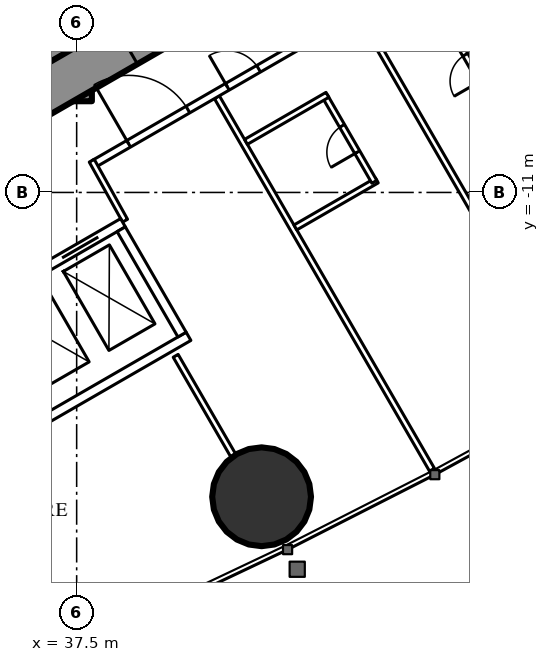
"""IFC4 building model, lengths in metres.
Left out: names, types, materials, properties, quantities, classifications, styles, units other than length and angle.
Written with IfcOpenShell. Run it as: python <this file> out.ifc"""

import sys

from ifc_helpers import new_model, si_unit, direction, frame, frame_2d, origin, origin_2d, place, context, subcontext, project, spatial, rectangle, hollow_circle, extrude, element, fill, save


model = new_model("IFC4")
c1 = context("Model", 3, precision=1e-05, world=origin(), true_north=direction((0.0, 1.0)))
c2 = subcontext(c1, "Body", "Model", "MODEL_VIEW")
j1 = project(units=[si_unit("LENGTHUNIT", "METRE"), si_unit("PLANEANGLEUNIT", "RADIAN")], contexts=[c1])
p1 = place(None, origin())
s1 = spatial("IfcSite", under=j1, at=p1, CompositionType="ELEMENT")
p2 = place(p1, origin())
s2 = spatial("IfcBuilding", under=s1, at=p2, CompositionType="ELEMENT")
p3 = place(p2, frame((0.0, 0.0, 90.6)))
s3 = spatial("IfcBuildingStorey", under=s2, at=p3, CompositionType="ELEMENT", Elevation=90.6)
p4 = place(p3, frame((42.366, -19.007, 0.0), z_axis=(0.0, 0.0, 1.0), x_axis=(1.0, 0.0, 0.0)))
e1 = element("IfcColumn", 1, at=p4, inside=s3, PredefinedType="COLUMN", context=c2, shape_type="SweptSolid", body=[
    extrude(hollow_circle(Radius=1.3, WallThickness=0.1, at=origin_2d()), origin(), (0.0, 0.0, 1.0), 3.5),
])
p5 = place(p3, frame((37.3, -8.6, 0.0), z_axis=(0.0, 0.0, 1.0), x_axis=(0.0, 1.0, 0.0)))
e2 = element("IfcWall", 2, at=p5, inside=s3, PredefinedType="SHEAR", context=c2, shape_type="SweptSolid", body=[
    extrude(rectangle(XDim=17.2, YDim=1.2, at=frame_2d((8.6, 0.0))), origin(), (0.0, 0.0, 1.0), 3.5),
])
p6 = place(p5, frame((7.7, 0.0, 0.0)))
e3 = element("IfcOpeningElement", 3, at=p6, cuts=e2, PredefinedType="OPENING", context=c2, shape_type="SweptSolid", body=[
    extrude(rectangle(XDim=1.8, YDim=2.2, at=frame_2d((0.9, 1.1))), frame((0.0, 0.61, 0.0), z_axis=(0.0, -1.0, 0.0), x_axis=(1.0, 0.0, 0.0)), (0.0, 0.0, 1.0), 1.22),
])
p7 = place(p3, frame((27.2, -13.8, 0.0), z_axis=(0.0, 0.0, 1.0), x_axis=(0.866027159892, 0.499996958321, 0.0)))
e4 = element("IfcWall", 4, at=p7, inside=s3, PredefinedType="SHEAR", context=c2, shape_type="SweptSolid", body=[
    extrude(rectangle(XDim=27.947, YDim=1.2, at=frame_2d((13.973, 0.0))), origin(), (0.0, 0.0, 1.0), 3.5),
])
p8 = place(p7, frame((4.6, 0.0, 0.0)))
e5 = element("IfcOpeningElement", 5, at=p8, cuts=e4, PredefinedType="OPENING", context=c2, shape_type="SweptSolid", body=[
    extrude(rectangle(XDim=1.0, YDim=2.2, at=frame_2d((0.5, 1.1))), frame((0.0, 0.61, 0.0), z_axis=(0.0, -1.0, 0.0), x_axis=(1.0, 0.0, 0.0)), (0.0, 0.0, 1.0), 1.22),
])
p9 = place(p7, frame((13.395, 0.0, 0.0)))
e6 = element("IfcOpeningElement", 6, at=p9, cuts=e4, PredefinedType="OPENING", context=c2, shape_type="SweptSolid", body=[
    extrude(rectangle(XDim=1.8, YDim=2.2, at=frame_2d((0.9, 1.1))), frame((0.0, 0.61, 0.0), z_axis=(0.0, -1.0, 0.0), x_axis=(1.0, 0.0, 0.0)), (0.0, 0.0, 1.0), 1.22),
])
p10 = place(p3, frame((41.19, -8.494, 0.0), z_axis=(0.0, 0.0, 1.0), x_axis=(0.49999258054, -0.866029687369, 0.0)))
e7 = element("IfcWall", 7, at=p10, inside=s3, PredefinedType="PARTITIONING", context=c2, shape_type="SweptSolid", body=[
    extrude(rectangle(XDim=11.318, YDim=0.15, at=frame_2d((5.659, 0.0))), origin(), (0.0, 0.0, 1.0), 3.25),
])
p11 = place(p3, frame((44.954, -6.321, 0.0), z_axis=(0.0, 0.0, 1.0), x_axis=(0.500018676722, -0.866014620505, 0.0)))
e8 = element("IfcWall", 8, at=p11, inside=s3, PredefinedType="PARTITIONING", context=c2, shape_type="SweptSolid", body=[
    extrude(rectangle(XDim=8.704, YDim=0.15, at=frame_2d((4.352, 0.0))), origin(), (0.0, 0.0, 1.0), 2.2),
])
p12 = place(p3, frame((40.105, -15.299, 0.0), z_axis=(0.0, 0.0, 1.0), x_axis=(0.499978822259, -0.866037630414, 0.0)))
e9 = element("IfcWall", 9, at=p12, inside=s3, PredefinedType="PARTITIONING", context=c2, shape_type="SweptSolid", body=[
    extrude(rectangle(XDim=3.023, YDim=0.15, at=frame_2d((1.511, 0.0))), origin(), (0.0, 0.0, 1.0), 3.25),
])
p13 = place(p3, frame((37.96, -10.243, 0.0), z_axis=(0.0, 0.0, 1.0), x_axis=(0.866026429433, 0.499998223521, 0.0)))
e10 = element("IfcWall", 10, at=p13, inside=s3, PredefinedType="PARTITIONING", context=c2, shape_type="SweptSolid", body=[
    extrude(rectangle(XDim=20.487, YDim=0.2, at=frame_2d((10.243, 0.0))), origin(), (0.0, 0.0, 1.0), 3.25),
])
p14 = place(p13, frame((4.047, 0.0, 0.0)))
e11 = element("IfcOpeningElement", 11, at=p14, cuts=e10, PredefinedType="OPENING", context=c2, shape_type="SweptSolid", body=[
    extrude(rectangle(XDim=0.95, YDim=2.2, at=frame_2d((0.475, 1.1))), frame((0.0, 0.11, 0.0), z_axis=(0.0, -1.0, 0.0), x_axis=(1.0, 0.0, 0.0)), (0.0, 0.0, 1.0), 0.22),
])
p15 = place(p13, frame((11.04, 0.0, 0.0)))
e12 = element("IfcOpeningElement", 12, at=p15, cuts=e10, PredefinedType="OPENING", context=c2, shape_type="SweptSolid", body=[
    extrude(rectangle(XDim=0.95, YDim=2.2, at=frame_2d((0.475, 1.1))), frame((0.0, 0.11, 0.0), z_axis=(0.0, -1.0, 0.0), x_axis=(1.0, 0.0, 0.0)), (0.0, 0.0, 1.0), 0.22),
])
p16 = place(p13, frame((13.035, 0.0, 0.0)))
e13 = element("IfcOpeningElement", 13, at=p16, cuts=e10, PredefinedType="OPENING", context=c2, shape_type="SweptSolid", body=[
    extrude(rectangle(XDim=0.95, YDim=2.2, at=frame_2d((0.475, 1.1))), frame((0.0, 0.11, 0.0), z_axis=(0.0, -1.0, 0.0), x_axis=(1.0, 0.0, 0.0)), (0.0, 0.0, 1.0), 0.22),
])
p17 = place(p13, frame((17.085, 0.0, 0.0)))
e14 = element("IfcOpeningElement", 14, at=p17, cuts=e10, PredefinedType="OPENING", context=c2, shape_type="SweptSolid", body=[
    extrude(rectangle(XDim=0.95, YDim=2.2, at=frame_2d((0.475, 1.1))), frame((0.0, 0.11, 0.0), z_axis=(0.0, -1.0, 0.0), x_axis=(1.0, 0.0, 0.0)), (0.0, 0.0, 1.0), 0.22),
])
p18 = place(p13, frame((1.048, 0.0, 0.0)))
e15 = element("IfcOpeningElement", 15, at=p18, cuts=e10, PredefinedType="OPENING", context=c2, shape_type="SweptSolid", body=[
    extrude(rectangle(XDim=1.8, YDim=2.2, at=frame_2d((0.9, 1.1))), frame((0.0, 0.11, 0.0), z_axis=(0.0, -1.0, 0.0), x_axis=(1.0, 0.0, 0.0)), (0.0, 0.0, 1.0), 0.22),
])
p19 = place(p3, frame((38.773, -11.742, 0.0), z_axis=(0.0, 0.0, 1.0), x_axis=(-0.485528096672, 0.8742210632, 0.0)))
e16 = element("IfcWall", 16, at=p19, inside=s3, PredefinedType="PARTITIONING", context=c2, shape_type="SweptSolid", body=[
    extrude(rectangle(XDim=1.805, YDim=0.15, at=frame_2d((0.903, 0.0))), origin(), (0.0, 0.0, 1.0), 3.25),
])
p20 = place(p3, frame((43.255, -11.921, 0.0), z_axis=(0.0, 0.0, 1.0), x_axis=(0.866006523861, 0.500032699561, 0.0)))
e17 = element("IfcWall", 17, at=p20, inside=s3, PredefinedType="PARTITIONING", context=c2, shape_type="SweptSolid", body=[
    extrude(rectangle(XDim=2.475, YDim=0.15, at=frame_2d((1.237, 0.0))), origin(), (0.0, 0.0, 1.0), 3.25),
])
p21 = place(p3, frame((44.033, -8.469, 0.0), z_axis=(0.0, 0.0, 1.0), x_axis=(0.500047596559, -0.865997922154, 0.0)))
e18 = element("IfcWall", 18, at=p21, inside=s3, PredefinedType="PARTITIONING", context=c2, shape_type="SweptSolid", body=[
    extrude(rectangle(XDim=2.6, YDim=0.15, at=frame_2d((1.3, 0.0))), origin(), (0.0, 0.0, 1.0), 3.25),
])
p22 = place(p21, frame((0.9, 0.0, 0.0)))
e19 = element("IfcOpeningElement", 19, at=p22, cuts=e18, PredefinedType="OPENING", context=c2, shape_type="SweptSolid", body=[
    extrude(rectangle(XDim=0.8, YDim=2.2, at=frame_2d((0.4, 1.1))), frame((0.0, 0.085, 0.0), z_axis=(0.0, -1.0, 0.0), x_axis=(1.0, 0.0, 0.0)), (0.0, 0.0, 1.0), 0.17),
])
p23 = place(p3, frame((41.955, -9.669, 0.0), z_axis=(0.0, 0.0, 1.0), x_axis=(0.866006523861, 0.500032699561, 0.0)))
e20 = element("IfcWall", 20, at=p23, inside=s3, PredefinedType="PARTITIONING", context=c2, shape_type="SweptSolid", body=[
    extrude(rectangle(XDim=2.475, YDim=0.15, at=frame_2d((1.237, 0.0))), origin(), (0.0, 0.0, 1.0), 3.25),
])
p24 = place(p3, frame((47.275, -6.597, 0.0), z_axis=(0.0, 0.0, 1.0), x_axis=(0.499936506574, -0.866062058628, 0.0)))
e21 = element("IfcWall", 21, at=p24, inside=s3, PredefinedType="PARTITIONING", context=c2, shape_type="SweptSolid", body=[
    extrude(rectangle(XDim=2.6, YDim=0.15, at=frame_2d((1.3, 0.0))), origin(), (0.0, 0.0, 1.0), 3.25),
])
p25 = place(p24, frame((0.9, 0.0, 0.0)))
e22 = element("IfcOpeningElement", 22, at=p25, cuts=e21, PredefinedType="OPENING", context=c2, shape_type="SweptSolid", body=[
    extrude(rectangle(XDim=0.8, YDim=2.2, at=frame_2d((0.4, 1.1))), frame((0.0, 0.085, 0.0), z_axis=(0.0, -1.0, 0.0), x_axis=(1.0, 0.0, 0.0)), (0.0, 0.0, 1.0), 0.17),
])
p26 = place(p3, frame((31.271, -16.097, 0.0), z_axis=(0.0, 0.0, 1.0), x_axis=(0.86604045752, 0.499973925258, 0.0)))
e23 = element("IfcWall", 23, at=p26, inside=s3, PredefinedType="PARTITIONING", context=c2, shape_type="SweptSolid", body=[
    extrude(rectangle(XDim=8.6, YDim=0.25, at=frame_2d((4.3, 0.0))), origin(), (0.0, 0.0, 1.0), 3.25),
])
p27 = place(p26, frame((0.75, 0.0, 0.0)))
e24 = element("IfcOpeningElement", 24, at=p27, cuts=e23, PredefinedType="OPENING", context=c2, shape_type="SweptSolid", body=[
    extrude(rectangle(XDim=1.1, YDim=2.2, at=frame_2d((0.55, 1.1))), frame((0.0, 0.135, 0.0), z_axis=(0.0, -1.0, 0.0), x_axis=(1.0, 0.0, 0.0)), (0.0, 0.0, 1.0), 0.27),
])
p28 = place(p26, frame((2.75, 0.0, 0.0)))
e25 = element("IfcOpeningElement", 25, at=p28, cuts=e23, PredefinedType="OPENING", context=c2, shape_type="SweptSolid", body=[
    extrude(rectangle(XDim=1.1, YDim=2.2, at=frame_2d((0.55, 1.1))), frame((0.0, 0.135, 0.0), z_axis=(0.0, -1.0, 0.0), x_axis=(1.0, 0.0, 0.0)), (0.0, 0.0, 1.0), 0.27),
])
p29 = place(p26, frame((4.75, 0.0, 0.0)))
e26 = element("IfcOpeningElement", 26, at=p29, cuts=e23, PredefinedType="OPENING", context=c2, shape_type="SweptSolid", body=[
    extrude(rectangle(XDim=1.1, YDim=2.2, at=frame_2d((0.55, 1.1))), frame((0.0, 0.135, 0.0), z_axis=(0.0, -1.0, 0.0), x_axis=(1.0, 0.0, 0.0)), (0.0, 0.0, 1.0), 0.27),
])
p30 = place(p26, frame((6.75, 0.0, 0.0)))
e27 = element("IfcOpeningElement", 27, at=p30, cuts=e23, PredefinedType="OPENING", context=c2, shape_type="SweptSolid", body=[
    extrude(rectangle(XDim=1.1, YDim=2.2, at=frame_2d((0.55, 1.1))), frame((0.0, 0.135, 0.0), z_axis=(0.0, -1.0, 0.0), x_axis=(1.0, 0.0, 0.0)), (0.0, 0.0, 1.0), 0.27),
])
p31 = place(p3, frame((32.996, -19.086, 0.0), z_axis=(0.0, 0.0, 1.0), x_axis=(0.866028165386, 0.499995216735, 0.0)))
e28 = element("IfcWall", 28, at=p31, inside=s3, PredefinedType="PARTITIONING", context=c2, shape_type="SweptSolid", body=[
    extrude(rectangle(XDim=8.6, YDim=0.25, at=frame_2d((4.3, 0.0))), origin(), (0.0, 0.0, 1.0), 3.25),
])
p32 = place(p3, frame((38.673, -11.968, 0.0), z_axis=(0.0, 0.0, 1.0), x_axis=(0.499929347863, -0.866066190972, 0.0)))
e29 = element("IfcWall", 29, at=p32, inside=s3, PredefinedType="PARTITIONING", context=c2, shape_type="SweptSolid", body=[
    extrude(rectangle(XDim=3.201, YDim=0.25, at=frame_2d((1.6, 0.0))), origin(), (0.0, 0.0, 1.0), 3.25),
])
p33 = place(p22, origin())
e30 = element("IfcDoor", 30, at=p33, inside=s3, OperationType="SINGLE_SWING_RIGHT", PredefinedType="DOOR", context=c2, shape_type="SweptSolid", body=[
    extrude(rectangle(XDim=0.8, YDim=2.2, at=frame_2d((0.4, 1.1))), frame((0.0, 0.025, 0.0), z_axis=(0.0, -1.0, 0.0), x_axis=(1.0, 0.0, 0.0)), (0.0, 0.0, 1.0), 0.05),
])
fill(e19, e30)
p34 = place(p14, origin())
e31 = element("IfcDoor", 31, at=p34, inside=s3, OperationType="SINGLE_SWING_LEFT", PredefinedType="DOOR", context=c2, shape_type="SweptSolid", body=[
    extrude(rectangle(XDim=0.95, YDim=2.2, at=frame_2d((0.475, 1.1))), frame((0.0, 0.025, 0.0), z_axis=(0.0, -1.0, 0.0), x_axis=(1.0, 0.0, 0.0)), (0.0, 0.0, 1.0), 0.05),
])
fill(e11, e31)
p35 = place(p25, origin())
e32 = element("IfcDoor", 32, at=p35, inside=s3, OperationType="SINGLE_SWING_RIGHT", PredefinedType="DOOR", context=c2, shape_type="SweptSolid", body=[
    extrude(rectangle(XDim=0.8, YDim=2.2, at=frame_2d((0.4, 1.1))), frame((0.0, 0.025, 0.0), z_axis=(0.0, -1.0, 0.0), x_axis=(1.0, 0.0, 0.0)), (0.0, 0.0, 1.0), 0.05),
])
fill(e22, e32)
p36 = place(p18, origin())
e33 = element("IfcDoor", 33, at=p36, inside=s3, OperationType="DOUBLE_DOOR_SINGLE_SWING", PredefinedType="DOOR", context=c2, shape_type="SweptSolid", body=[
    extrude(rectangle(XDim=1.8, YDim=2.2, at=frame_2d((0.9, 1.1))), frame((0.0, 0.025, 0.0), z_axis=(0.0, -1.0, 0.0), x_axis=(1.0, 0.0, 0.0)), (0.0, 0.0, 1.0), 0.05),
])
fill(e15, e33)
p37 = place(p30, origin())
e34 = element("IfcDoor", 34, at=p37, inside=s3, OperationType="DOUBLE_DOOR_SLIDING", PredefinedType="USERDEFINED", context=c2, shape_type="SweptSolid", body=[
    extrude(rectangle(XDim=1.1, YDim=2.2, at=frame_2d((0.55, 1.1))), frame((0.0, 0.025, 0.0), z_axis=(0.0, -1.0, 0.0), x_axis=(1.0, 0.0, 0.0)), (0.0, 0.0, 1.0), 0.05),
])
fill(e27, e34)
save(model, sys.argv[1])
